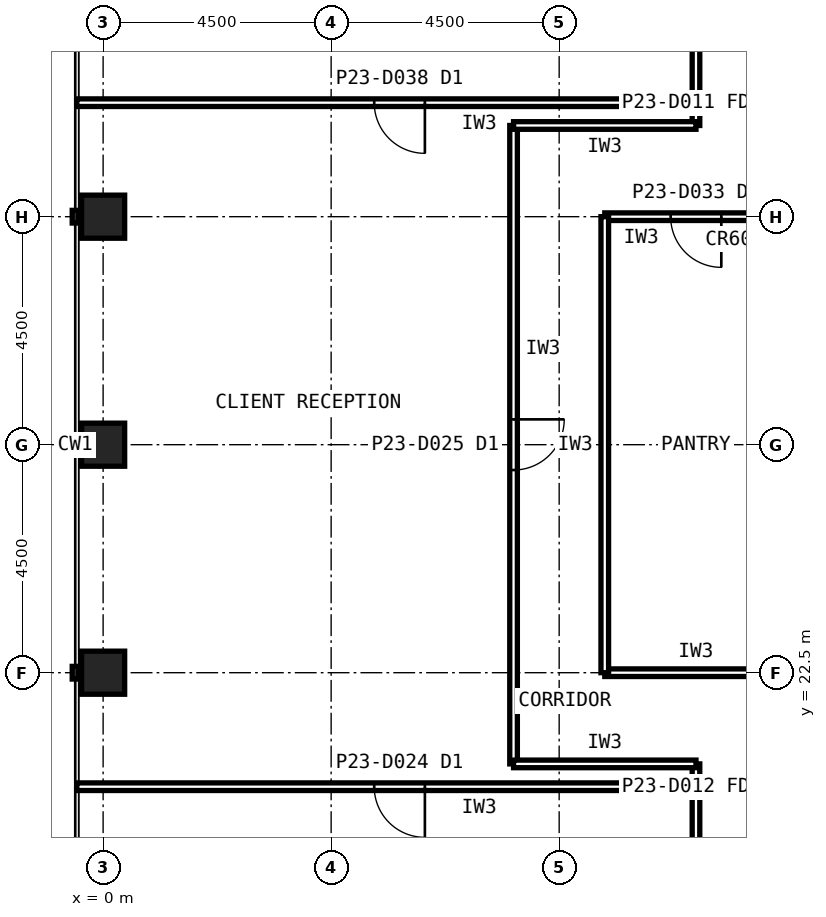
"""IFC4 building model, lengths in metres.
Left out: names, types, materials, properties, quantities, classifications, styles, units other than length and angle.
Written with IfcOpenShell. Run it as: python <this file> out.ifc"""

import sys

from ifc_helpers import new_model, si_unit, direction, frame, frame_2d, origin, origin_2d, place, context, subcontext, project, spatial, rectangle, hollow_rectangle, extrude, element, fill, save


model = new_model("IFC4")
c1 = context("Model", 3, precision=1e-05, world=origin(), true_north=direction((0.0, 1.0)))
c2 = subcontext(c1, "Body", "Model", "MODEL_VIEW")
j1 = project(units=[si_unit("LENGTHUNIT", "METRE"), si_unit("PLANEANGLEUNIT", "RADIAN")], contexts=[c1])
p1 = place(None, origin())
s1 = spatial("IfcSite", under=j1, at=p1, CompositionType="ELEMENT")
p2 = place(p1, origin())
s2 = spatial("IfcBuilding", under=s1, at=p2, CompositionType="ELEMENT")
p3 = place(p2, frame((0.0, 0.0, 96.2)))
s3 = spatial("IfcBuildingStorey", under=s2, at=p3, CompositionType="ELEMENT", Elevation=96.2)
for number, where, z_axis, x_axis in (
    (1, (0.0, 31.5, 0.0), (0.0, 0.0, 1.0), (1.0, 0.0, 0.0)),
    (2, (0.0, 27.0, 0.0), (0.0, 0.0, 1.0), (1.0, 0.0, 0.0)),
    (3, (0.0, 22.5, 0.0), (0.0, 0.0, 1.0), (1.0, 0.0, 0.0)),
):
    element("IfcColumn", number, at=place(p3, frame(where, z_axis=z_axis, x_axis=x_axis)), inside=s3, PredefinedType="COLUMN", context=c2, shape_type="SweptSolid", body=[
        extrude(hollow_rectangle(XDim=0.8, YDim=0.8, WallThickness=0.045, at=origin_2d()), origin(), (0.0, 0.0, 1.0), 4.2),
    ])
p4 = place(p3, frame((8.1, 33.3, 0.0), z_axis=(0.0, 0.0, 1.0), x_axis=(0.0, -1.0, 0.0)))
e4 = element("IfcWall", 4, at=p4, inside=s3, PredefinedType="PARTITIONING", context=c2, shape_type="SweptSolid", body=[
    extrude(rectangle(XDim=12.6, YDim=0.15, at=frame_2d((6.3, 0.0))), origin(), (0.0, 0.0, 1.0), 4.04),
])
p5 = place(p4, frame((5.8, 0.0, 0.0)))
e5 = element("IfcOpeningElement", 5, at=p5, cuts=e4, PredefinedType="OPENING", context=c2, shape_type="SweptSolid", body=[
    extrude(rectangle(XDim=1.0, YDim=2.1, at=frame_2d((0.5, 1.05))), frame((0.0, 0.085, 0.0), z_axis=(0.0, -1.0, 0.0), x_axis=(1.0, 0.0, 0.0)), (0.0, 0.0, 1.0), 0.17),
])
p6 = place(p3, frame((11.7, 42.3, 0.0), z_axis=(0.0, 0.0, 1.0), x_axis=(0.0, -1.0, 0.0)))
e6 = element("IfcWall", 6, at=p6, inside=s3, PredefinedType="PARTITIONING", context=c2, shape_type="SweptSolid", body=[
    extrude(rectangle(XDim=9.0, YDim=0.15, at=frame_2d((4.5, 0.0))), origin(), (0.0, 0.0, 1.0), 4.04),
])
p7 = place(p3, frame((11.7, 20.7, 0.0), z_axis=(0.0, 0.0, 1.0), x_axis=(0.0, -1.0, 0.0)))
e7 = element("IfcWall", 7, at=p7, inside=s3, PredefinedType="PARTITIONING", context=c2, shape_type="SweptSolid", body=[
    extrude(rectangle(XDim=7.2, YDim=0.15, at=frame_2d((3.6, 0.0))), origin(), (0.0, 0.0, 1.0), 4.04),
])
for number, where, z_axis, x_axis in (
    (8, (8.1, 20.7, 0.0), (0.0, 0.0, 1.0), (1.0, 0.0, 0.0)),
    (9, (11.7, 33.3, 0.0), (0.0, 0.0, 1.0), (-1.0, 0.0, 0.0)),
):
    element("IfcWall", number, at=place(p3, frame(where, z_axis=z_axis, x_axis=x_axis)), inside=s3, PredefinedType="PARTITIONING", context=c2, shape_type="SweptSolid", body=[
        extrude(rectangle(XDim=3.6, YDim=0.15, at=frame_2d((1.8, 0.0))), origin(), (0.0, 0.0, 1.0), 4.04),
    ])
p8 = place(p3, frame((9.9, 22.5, 0.0), z_axis=(0.0, 0.0, 1.0), x_axis=(1.0, 0.0, 0.0)))
e10 = element("IfcWall", 10, at=p8, inside=s3, PredefinedType="PARTITIONING", context=c2, shape_type="SweptSolid", body=[
    extrude(rectangle(XDim=3.6, YDim=0.15, at=frame_2d((1.8, 0.0))), origin(), (0.0, 0.0, 1.0), 3.189),
])
p9 = place(p3, frame((13.5, 31.5, 0.0), z_axis=(0.0, 0.0, 1.0), x_axis=(-1.0, 0.0, 0.0)))
e11 = element("IfcWall", 11, at=p9, inside=s3, PredefinedType="PARTITIONING", context=c2, shape_type="SweptSolid", body=[
    extrude(rectangle(XDim=3.6, YDim=0.15, at=frame_2d((1.8, 0.0))), origin(), (0.0, 0.0, 1.0), 3.189),
])
p10 = place(p9, frame((1.3, 0.0, 0.0)))
e12 = element("IfcOpeningElement", 12, at=p10, cuts=e11, PredefinedType="OPENING", context=c2, shape_type="SweptSolid", body=[
    extrude(rectangle(XDim=1.0, YDim=2.1, at=frame_2d((0.5, 1.05))), frame((0.0, 0.085, 0.0), z_axis=(0.0, -1.0, 0.0), x_axis=(1.0, 0.0, 0.0)), (0.0, 0.0, 1.0), 0.17),
])
p11 = place(p3, frame((9.9, 31.5, 0.0), z_axis=(0.0, 0.0, 1.0), x_axis=(0.0, -1.0, 0.0)))
e13 = element("IfcWall", 13, at=p11, inside=s3, PredefinedType="PARTITIONING", context=c2, shape_type="SweptSolid", body=[
    extrude(rectangle(XDim=9.0, YDim=0.15, at=frame_2d((4.5, 0.0))), origin(), (0.0, 0.0, 1.0), 4.04),
])
p12 = place(p3, frame((11.7, 33.75, 0.0), z_axis=(0.0, 0.0, 1.0), x_axis=(-1.0, 0.0, 0.0)))
e14 = element("IfcWall", 14, at=p12, inside=s3, PredefinedType="PARTITIONING", context=c2, shape_type="SweptSolid", body=[
    extrude(rectangle(XDim=12.22, YDim=0.15, at=frame_2d((6.11, 0.0))), origin(), (0.0, 0.0, 1.0), 4.04),
])
p13 = place(p12, frame((5.35, 0.0, 0.0)))
e15 = element("IfcOpeningElement", 15, at=p13, cuts=e14, PredefinedType="OPENING", context=c2, shape_type="SweptSolid", body=[
    extrude(rectangle(XDim=1.0, YDim=2.1, at=frame_2d((0.5, 1.05))), frame((0.0, 0.085, 0.0), z_axis=(0.0, -1.0, 0.0), x_axis=(1.0, 0.0, 0.0)), (0.0, 0.0, 1.0), 0.17),
])
p14 = place(p3, frame((11.7, 20.25, 0.0), z_axis=(0.0, 0.0, 1.0), x_axis=(-1.0, 0.0, 0.0)))
e16 = element("IfcWall", 16, at=p14, inside=s3, PredefinedType="PARTITIONING", context=c2, shape_type="SweptSolid", body=[
    extrude(rectangle(XDim=12.22, YDim=0.15, at=frame_2d((6.11, 0.0))), origin(), (0.0, 0.0, 1.0), 4.04),
])
p15 = place(p14, frame((5.35, 0.0, 0.0)))
e17 = element("IfcOpeningElement", 17, at=p15, cuts=e16, PredefinedType="OPENING", context=c2, shape_type="SweptSolid", body=[
    extrude(rectangle(XDim=1.0, YDim=2.1, at=frame_2d((0.5, 1.05))), frame((0.0, 0.085, 0.0), z_axis=(0.0, -1.0, 0.0), x_axis=(1.0, 0.0, 0.0)), (0.0, 0.0, 1.0), 0.17),
])
p16 = place(p5, origin())
e18 = element("IfcDoor", 18, at=p16, inside=s3, OperationType="SINGLE_SWING_LEFT", PredefinedType="DOOR", context=c2, shape_type="SweptSolid", body=[
    extrude(rectangle(XDim=1.0, YDim=2.1, at=frame_2d((0.5, 1.05))), frame((0.0, 0.025, 0.0), z_axis=(0.0, -1.0, 0.0), x_axis=(1.0, 0.0, 0.0)), (0.0, 0.0, 1.0), 0.05),
])
fill(e5, e18)
p17 = place(p10, origin())
e19 = element("IfcDoor", 19, at=p17, inside=s3, OperationType="SINGLE_SWING_LEFT", PredefinedType="DOOR", context=c2, shape_type="SweptSolid", body=[
    extrude(rectangle(XDim=1.0, YDim=2.1, at=frame_2d((0.5, 1.05))), frame((0.0, 0.025, 0.0), z_axis=(0.0, -1.0, 0.0), x_axis=(1.0, 0.0, 0.0)), (0.0, 0.0, 1.0), 0.05),
])
fill(e12, e19)
p18 = place(p13, origin())
e20 = element("IfcDoor", 20, at=p18, inside=s3, OperationType="SINGLE_SWING_LEFT", PredefinedType="DOOR", context=c2, shape_type="SweptSolid", body=[
    extrude(rectangle(XDim=1.0, YDim=2.1, at=frame_2d((0.5, 1.05))), frame((0.0, 0.025, 0.0), z_axis=(0.0, -1.0, 0.0), x_axis=(1.0, 0.0, 0.0)), (0.0, 0.0, 1.0), 0.05),
])
fill(e15, e20)
p19 = place(p15, origin())
e21 = element("IfcDoor", 21, at=p19, inside=s3, OperationType="SINGLE_SWING_LEFT", PredefinedType="DOOR", context=c2, shape_type="SweptSolid", body=[
    extrude(rectangle(XDim=1.0, YDim=2.1, at=frame_2d((0.5, 1.05))), frame((0.0, 0.025, 0.0), z_axis=(0.0, -1.0, 0.0), x_axis=(1.0, 0.0, 0.0)), (0.0, 0.0, 1.0), 0.05),
])
fill(e17, e21)
save(model, sys.argv[1])
